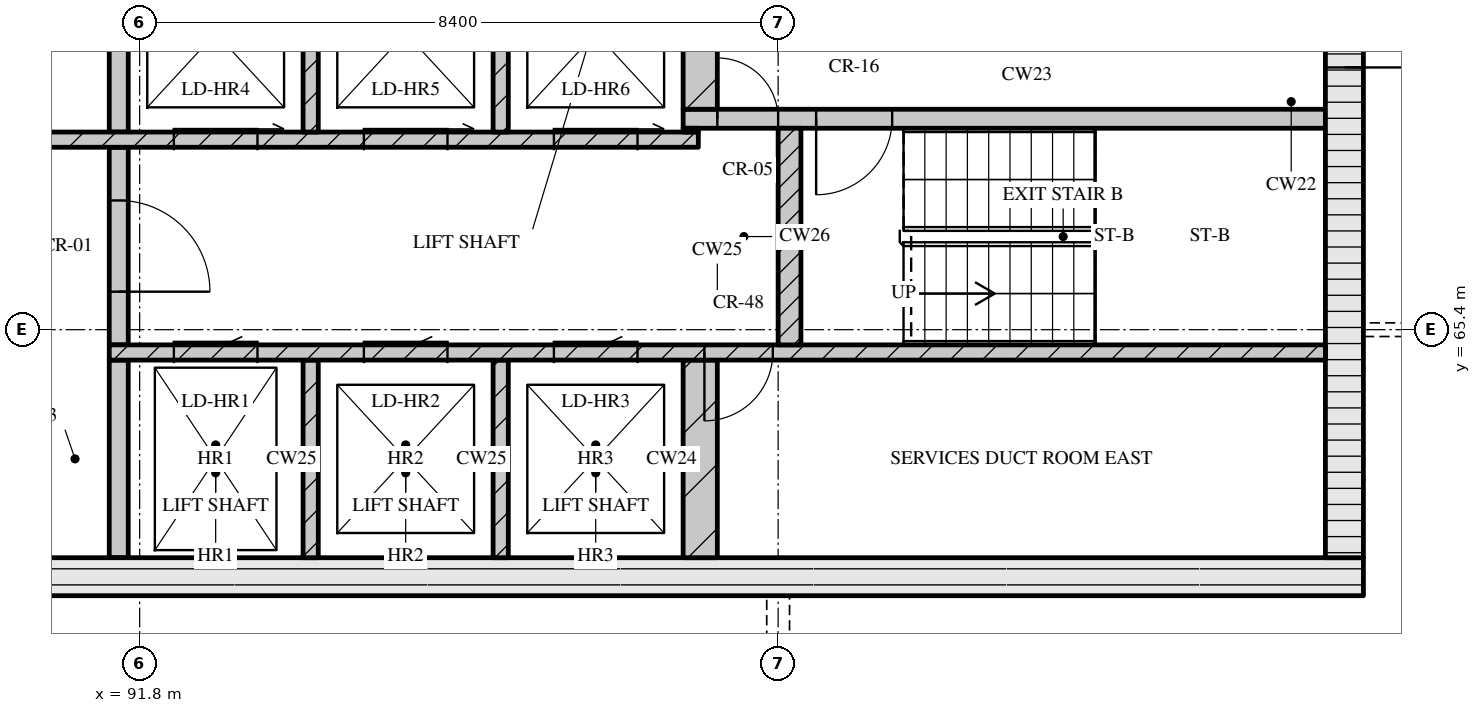
"""IFC4 building model, lengths in metres.
Left out: names, types, materials, properties, quantities, classifications, styles, units other than length and angle.
Written with IfcOpenShell. Run it as: python <this file> out.ifc"""

import sys

from ifc_helpers import new_model, si_unit, direction, frame, frame_2d, origin, place, context, subcontext, project, spatial, rectangle, extrude, element, fill, save


model = new_model("IFC4")
c1 = context("Model", 3, precision=1e-05, world=origin(), true_north=direction((0.0, 1.0)))
c2 = subcontext(c1, "Body", "Model", "MODEL_VIEW")
j1 = project(units=[si_unit("LENGTHUNIT", "METRE"), si_unit("PLANEANGLEUNIT", "RADIAN")], contexts=[c1])
p1 = place(None, origin())
s1 = spatial("IfcSite", under=j1, at=p1, CompositionType="ELEMENT")
p2 = place(p1, origin())
s2 = spatial("IfcBuilding", under=s1, at=p2, CompositionType="ELEMENT")
p3 = place(p2, frame((0.0, 0.0, 288.75)))
s3 = spatial("IfcBuildingStorey", under=s2, at=p3, CompositionType="ELEMENT", Elevation=288.75)
p4 = place(p3, frame((67.3, 62.15, 0.0), z_axis=(0.0, 0.0, 1.0), x_axis=(1.0, 0.0, 0.0)))
e1 = element("IfcWall", 1, at=p4, inside=s3, PredefinedType="SOLIDWALL", context=c2, shape_type="SweptSolid", body=[
    extrude(rectangle(XDim=40.6, YDim=0.5, at=frame_2d((20.3, 0.0))), origin(), (0.0, 0.0, 1.0), 3.32),
])
p5 = place(p4, frame((20.65, 0.0, 0.0)))
e2 = element("IfcOpeningElement", 2, at=p5, cuts=e1, PredefinedType="OPENING", context=c2, shape_type="SweptSolid", body=[
    extrude(rectangle(XDim=1.8, YDim=2.1, at=frame_2d((0.9, 1.05))), frame((0.0, 0.26, 0.0), z_axis=(0.0, -1.0, 0.0), x_axis=(1.0, 0.0, 0.0)), (0.0, 0.0, 1.0), 0.52),
])
p6 = place(p3, frame((107.65, 62.4, 0.0), z_axis=(0.0, 0.0, 1.0), x_axis=(0.0, 1.0, 0.0)))
e3 = element("IfcWall", 3, at=p6, inside=s3, PredefinedType="SOLIDWALL", context=c2, shape_type="SweptSolid", body=[
    extrude(rectangle(XDim=12.0, YDim=0.5, at=frame_2d((6.0, 0.0))), origin(), (0.0, 0.0, 1.0), 3.32),
])
p7 = place(p6, frame((6.45, 0.0, 0.0)))
e4 = element("IfcOpeningElement", 4, at=p7, cuts=e3, PredefinedType="OPENING", context=c2, shape_type="SweptSolid", body=[
    extrude(rectangle(XDim=1.2, YDim=2.1, at=frame_2d((0.6, 1.05))), frame((0.0, 0.26, 0.0), z_axis=(0.0, -1.0, 0.0), x_axis=(1.0, 0.0, 0.0)), (0.0, 0.0, 1.0), 0.52),
])
p8 = place(p3, frame((91.525, 62.4, 0.0), z_axis=(0.0, 0.0, 1.0), x_axis=(0.0, 1.0, 0.0)))
e5 = element("IfcWall", 5, at=p8, inside=s3, PredefinedType="SOLIDWALL", context=c2, shape_type="SweptSolid", body=[
    extrude(rectangle(XDim=2.6, YDim=0.25, at=frame_2d((1.3, 0.0))), origin(), (0.0, 0.0, 1.0), 3.32),
])
for number, where, z_axis, x_axis in (
    (6, (94.05, 62.4, 0.0), (0.0, 0.0, 1.0), (0.0, 1.0, 0.0)),
    (7, (96.55, 62.4, 0.0), (0.0, 0.0, 1.0), (0.0, 1.0, 0.0)),
):
    element("IfcWall", number, at=place(p3, frame(where, z_axis=z_axis, x_axis=x_axis)), inside=s3, PredefinedType="SOLIDWALL", context=c2, shape_type="SweptSolid", body=[
        extrude(rectangle(XDim=2.6, YDim=0.2, at=frame_2d((1.3, 0.0))), origin(), (0.0, 0.0, 1.0), 3.32),
    ])
p9 = place(p3, frame((99.175, 62.4, 0.0), z_axis=(0.0, 0.0, 1.0), x_axis=(0.0, 1.0, 0.0)))
e8 = element("IfcWall", 8, at=p9, inside=s3, PredefinedType="SOLIDWALL", context=c2, shape_type="SweptSolid", body=[
    extrude(rectangle(XDim=2.6, YDim=0.45, at=frame_2d((1.3, 0.0))), origin(), (0.0, 0.0, 1.0), 3.32),
])
p10 = place(p3, frame((91.4, 65.1, 0.0), z_axis=(0.0, 0.0, 1.0), x_axis=(1.0, 0.0, 0.0)))
e9 = element("IfcWall", 9, at=p10, inside=s3, PredefinedType="SOLIDWALL", context=c2, shape_type="SweptSolid", body=[
    extrude(rectangle(XDim=16.0, YDim=0.2, at=frame_2d((8.0, 0.0))), origin(), (0.0, 0.0, 1.0), 3.32),
])
p11 = place(p10, frame((0.85, 0.0, 0.0)))
e10 = element("IfcOpeningElement", 10, at=p11, cuts=e9, PredefinedType="OPENING", context=c2, shape_type="SweptSolid", body=[
    extrude(rectangle(XDim=1.1, YDim=2.1, at=frame_2d((0.55, 1.05))), frame((0.0, 0.11, 0.0), z_axis=(0.0, -1.0, 0.0), x_axis=(1.0, 0.0, 0.0)), (0.0, 0.0, 1.0), 0.22),
])
p12 = place(p10, frame((3.35, 0.0, 0.0)))
e11 = element("IfcOpeningElement", 11, at=p12, cuts=e9, PredefinedType="OPENING", context=c2, shape_type="SweptSolid", body=[
    extrude(rectangle(XDim=1.1, YDim=2.1, at=frame_2d((0.55, 1.05))), frame((0.0, 0.11, 0.0), z_axis=(0.0, -1.0, 0.0), x_axis=(1.0, 0.0, 0.0)), (0.0, 0.0, 1.0), 0.22),
])
p13 = place(p10, frame((5.85, 0.0, 0.0)))
e12 = element("IfcOpeningElement", 12, at=p13, cuts=e9, PredefinedType="OPENING", context=c2, shape_type="SweptSolid", body=[
    extrude(rectangle(XDim=1.1, YDim=2.1, at=frame_2d((0.55, 1.05))), frame((0.0, 0.11, 0.0), z_axis=(0.0, -1.0, 0.0), x_axis=(1.0, 0.0, 0.0)), (0.0, 0.0, 1.0), 0.22),
])
p14 = place(p10, frame((7.83, 0.0, 0.0)))
e13 = element("IfcOpeningElement", 13, at=p14, cuts=e9, PredefinedType="OPENING", context=c2, shape_type="SweptSolid", body=[
    extrude(rectangle(XDim=0.9, YDim=2.1, at=frame_2d((0.45, 1.05))), frame((0.0, 0.11, 0.0), z_axis=(0.0, -1.0, 0.0), x_axis=(1.0, 0.0, 0.0)), (0.0, 0.0, 1.0), 0.22),
])
p15 = place(p3, frame((91.525, 65.2, 0.0), z_axis=(0.0, 0.0, 1.0), x_axis=(0.0, 1.0, 0.0)))
e14 = element("IfcWall", 14, at=p15, inside=s3, PredefinedType="SOLIDWALL", context=c2, shape_type="SweptSolid", body=[
    extrude(rectangle(XDim=2.6, YDim=0.25, at=frame_2d((1.3, 0.0))), origin(), (0.0, 0.0, 1.0), 3.32),
])
p16 = place(p15, frame((0.7, 0.0, 0.0)))
e15 = element("IfcOpeningElement", 15, at=p16, cuts=e14, PredefinedType="OPENING", context=c2, shape_type="SweptSolid", body=[
    extrude(rectangle(XDim=1.2, YDim=2.1, at=frame_2d((0.6, 1.05))), frame((0.0, 0.135, 0.0), z_axis=(0.0, -1.0, 0.0), x_axis=(1.0, 0.0, 0.0)), (0.0, 0.0, 1.0), 0.27),
])
p17 = place(p3, frame((100.35, 65.2, 0.0), z_axis=(0.0, 0.0, 1.0), x_axis=(0.0, 1.0, 0.0)))
e16 = element("IfcWall", 16, at=p17, inside=s3, PredefinedType="SOLIDWALL", context=c2, shape_type="SweptSolid", body=[
    extrude(rectangle(XDim=2.85, YDim=0.3, at=frame_2d((1.425, 0.0))), origin(), (0.0, 0.0, 1.0), 3.32),
])
p18 = place(p3, frame((76.05, 67.9, 0.0), z_axis=(0.0, 0.0, 1.0), x_axis=(1.0, 0.0, 0.0)))
e17 = element("IfcWall", 17, at=p18, inside=s3, PredefinedType="SOLIDWALL", context=c2, shape_type="SweptSolid", body=[
    extrude(rectangle(XDim=23.1, YDim=0.2, at=frame_2d((11.55, 0.0))), origin(), (0.0, 0.0, 1.0), 3.32),
])
p19 = place(p18, frame((1.95, 0.0, 0.0)))
e18 = element("IfcOpeningElement", 18, at=p19, cuts=e17, PredefinedType="OPENING", context=c2, shape_type="SweptSolid", body=[
    extrude(rectangle(XDim=0.9, YDim=2.1, at=frame_2d((0.45, 1.05))), frame((0.0, 0.11, 0.0), z_axis=(0.0, -1.0, 0.0), x_axis=(1.0, 0.0, 0.0)), (0.0, 0.0, 1.0), 0.22),
])
p20 = place(p18, frame((5.66, 0.0, 0.0)))
e19 = element("IfcOpeningElement", 19, at=p20, cuts=e17, PredefinedType="OPENING", context=c2, shape_type="SweptSolid", body=[
    extrude(rectangle(XDim=0.9, YDim=2.1, at=frame_2d((0.45, 1.05))), frame((0.0, 0.11, 0.0), z_axis=(0.0, -1.0, 0.0), x_axis=(1.0, 0.0, 0.0)), (0.0, 0.0, 1.0), 0.22),
])
p21 = place(p18, frame((9.7, 0.0, 0.0)))
e20 = element("IfcOpeningElement", 20, at=p21, cuts=e17, PredefinedType="OPENING", context=c2, shape_type="SweptSolid", body=[
    extrude(rectangle(XDim=0.9, YDim=2.1, at=frame_2d((0.45, 1.05))), frame((0.0, 0.11, 0.0), z_axis=(0.0, -1.0, 0.0), x_axis=(1.0, 0.0, 0.0)), (0.0, 0.0, 1.0), 0.22),
])
p22 = place(p18, frame((13.55, 0.0, 0.0)))
e21 = element("IfcOpeningElement", 21, at=p22, cuts=e17, PredefinedType="OPENING", context=c2, shape_type="SweptSolid", body=[
    extrude(rectangle(XDim=1.0, YDim=2.1, at=frame_2d((0.5, 1.05))), frame((0.0, 0.11, 0.0), z_axis=(0.0, -1.0, 0.0), x_axis=(1.0, 0.0, 0.0)), (0.0, 0.0, 1.0), 0.22),
])
p23 = place(p18, frame((16.2, 0.0, 0.0)))
e22 = element("IfcOpeningElement", 22, at=p23, cuts=e17, PredefinedType="OPENING", context=c2, shape_type="SweptSolid", body=[
    extrude(rectangle(XDim=1.1, YDim=2.1, at=frame_2d((0.55, 1.05))), frame((0.0, 0.11, 0.0), z_axis=(0.0, -1.0, 0.0), x_axis=(1.0, 0.0, 0.0)), (0.0, 0.0, 1.0), 0.22),
])
p24 = place(p18, frame((18.7, 0.0, 0.0)))
e23 = element("IfcOpeningElement", 23, at=p24, cuts=e17, PredefinedType="OPENING", context=c2, shape_type="SweptSolid", body=[
    extrude(rectangle(XDim=1.1, YDim=2.1, at=frame_2d((0.55, 1.05))), frame((0.0, 0.11, 0.0), z_axis=(0.0, -1.0, 0.0), x_axis=(1.0, 0.0, 0.0)), (0.0, 0.0, 1.0), 0.22),
])
p25 = place(p18, frame((21.2, 0.0, 0.0)))
e24 = element("IfcOpeningElement", 24, at=p25, cuts=e17, PredefinedType="OPENING", context=c2, shape_type="SweptSolid", body=[
    extrude(rectangle(XDim=1.1, YDim=2.1, at=frame_2d((0.55, 1.05))), frame((0.0, 0.11, 0.0), z_axis=(0.0, -1.0, 0.0), x_axis=(1.0, 0.0, 0.0)), (0.0, 0.0, 1.0), 0.22),
])
p26 = place(p3, frame((91.525, 68.0, 0.0), z_axis=(0.0, 0.0, 1.0), x_axis=(0.0, 1.0, 0.0)))
e25 = element("IfcWall", 25, at=p26, inside=s3, PredefinedType="SOLIDWALL", context=c2, shape_type="SweptSolid", body=[
    extrude(rectangle(XDim=2.6, YDim=0.25, at=frame_2d((1.3, 0.0))), origin(), (0.0, 0.0, 1.0), 3.32),
])
for number, where, z_axis, x_axis in (
    (26, (94.05, 68.0, 0.0), (0.0, 0.0, 1.0), (0.0, 1.0, 0.0)),
    (27, (96.55, 68.0, 0.0), (0.0, 0.0, 1.0), (0.0, 1.0, 0.0)),
):
    element("IfcWall", number, at=place(p3, frame(where, z_axis=z_axis, x_axis=x_axis)), inside=s3, PredefinedType="SOLIDWALL", context=c2, shape_type="SweptSolid", body=[
        extrude(rectangle(XDim=2.6, YDim=0.2, at=frame_2d((1.3, 0.0))), origin(), (0.0, 0.0, 1.0), 3.32),
    ])
p27 = place(p3, frame((98.95, 68.025, 0.0), z_axis=(0.0, 0.0, 1.0), x_axis=(1.0, 0.0, 0.0)))
e28 = element("IfcWall", 28, at=p27, inside=s3, PredefinedType="SOLIDWALL", context=c2, shape_type="SweptSolid", body=[
    extrude(rectangle(XDim=0.2, YDim=0.05, at=frame_2d((0.1, 0.0))), origin(), (0.0, 0.0, 1.0), 3.32),
])
p28 = place(p3, frame((98.95, 68.175, 0.0), z_axis=(0.0, 0.0, 1.0), x_axis=(1.0, 0.0, 0.0)))
e29 = element("IfcWall", 29, at=p28, inside=s3, PredefinedType="SOLIDWALL", context=c2, shape_type="SweptSolid", body=[
    extrude(rectangle(XDim=8.45, YDim=0.25, at=frame_2d((4.225, 0.0))), origin(), (0.0, 0.0, 1.0), 3.32),
])
p29 = place(p28, frame((0.45, 0.0, 0.0)))
e30 = element("IfcOpeningElement", 30, at=p29, cuts=e29, PredefinedType="OPENING", context=c2, shape_type="SweptSolid", body=[
    extrude(rectangle(XDim=0.8, YDim=2.1, at=frame_2d((0.4, 1.05))), frame((0.0, 0.135, 0.0), z_axis=(0.0, -1.0, 0.0), x_axis=(1.0, 0.0, 0.0)), (0.0, 0.0, 1.0), 0.27),
])
p30 = place(p28, frame((1.75, 0.0, 0.0)))
e31 = element("IfcOpeningElement", 31, at=p30, cuts=e29, PredefinedType="OPENING", context=c2, shape_type="SweptSolid", body=[
    extrude(rectangle(XDim=1.0, YDim=2.1, at=frame_2d((0.5, 1.05))), frame((0.0, 0.135, 0.0), z_axis=(0.0, -1.0, 0.0), x_axis=(1.0, 0.0, 0.0)), (0.0, 0.0, 1.0), 0.27),
])
p31 = place(p3, frame((99.175, 68.3, 0.0), z_axis=(0.0, 0.0, 1.0), x_axis=(0.0, 1.0, 0.0)))
e32 = element("IfcWall", 32, at=p31, inside=s3, PredefinedType="SOLIDWALL", context=c2, shape_type="SweptSolid", body=[
    extrude(rectangle(XDim=2.3, YDim=0.45, at=frame_2d((1.15, 0.0))), origin(), (0.0, 0.0, 1.0), 3.32),
])
p32 = place(p11, origin())
e33 = element("IfcDoor", 33, at=p32, inside=s3, OperationType="SLIDING_TO_LEFT", PredefinedType="DOOR", context=c2, shape_type="SweptSolid", body=[
    extrude(rectangle(XDim=1.1, YDim=2.1, at=frame_2d((0.55, 1.05))), frame((0.0, 0.025, 0.0), z_axis=(0.0, -1.0, 0.0), x_axis=(1.0, 0.0, 0.0)), (0.0, 0.0, 1.0), 0.05),
])
fill(e10, e33)
p33 = place(p12, origin())
e34 = element("IfcDoor", 34, at=p33, inside=s3, OperationType="SLIDING_TO_LEFT", PredefinedType="DOOR", context=c2, shape_type="SweptSolid", body=[
    extrude(rectangle(XDim=1.1, YDim=2.1, at=frame_2d((0.55, 1.05))), frame((0.0, 0.025, 0.0), z_axis=(0.0, -1.0, 0.0), x_axis=(1.0, 0.0, 0.0)), (0.0, 0.0, 1.0), 0.05),
])
fill(e11, e34)
p34 = place(p13, origin())
e35 = element("IfcDoor", 35, at=p34, inside=s3, OperationType="SLIDING_TO_LEFT", PredefinedType="DOOR", context=c2, shape_type="SweptSolid", body=[
    extrude(rectangle(XDim=1.1, YDim=2.1, at=frame_2d((0.55, 1.05))), frame((0.0, 0.025, 0.0), z_axis=(0.0, -1.0, 0.0), x_axis=(1.0, 0.0, 0.0)), (0.0, 0.0, 1.0), 0.05),
])
fill(e12, e35)
p35 = place(p14, origin())
e36 = element("IfcDoor", 36, at=p35, inside=s3, OperationType="SINGLE_SWING_RIGHT", PredefinedType="DOOR", context=c2, shape_type="SweptSolid", body=[
    extrude(rectangle(XDim=0.9, YDim=2.1, at=frame_2d((0.45, 1.05))), frame((0.0, 0.025, 0.0), z_axis=(0.0, -1.0, 0.0), x_axis=(1.0, 0.0, 0.0)), (0.0, 0.0, 1.0), 0.05),
])
fill(e13, e36)
p36 = place(p16, origin())
e37 = element("IfcDoor", 37, at=p36, inside=s3, OperationType="SINGLE_SWING_RIGHT", PredefinedType="DOOR", context=c2, shape_type="SweptSolid", body=[
    extrude(rectangle(XDim=1.2, YDim=2.1, at=frame_2d((0.6, 1.05))), frame((0.0, 0.025, 0.0), z_axis=(0.0, -1.0, 0.0), x_axis=(1.0, 0.0, 0.0)), (0.0, 0.0, 1.0), 0.05),
])
fill(e15, e37)
p37 = place(p23, origin())
e38 = element("IfcDoor", 38, at=p37, inside=s3, OperationType="SLIDING_TO_RIGHT", PredefinedType="DOOR", context=c2, shape_type="SweptSolid", body=[
    extrude(rectangle(XDim=1.1, YDim=2.1, at=frame_2d((0.55, 1.05))), frame((0.0, 0.025, 0.0), z_axis=(0.0, -1.0, 0.0), x_axis=(1.0, 0.0, 0.0)), (0.0, 0.0, 1.0), 0.05),
])
fill(e22, e38)
p38 = place(p24, origin())
e39 = element("IfcDoor", 39, at=p38, inside=s3, OperationType="SLIDING_TO_RIGHT", PredefinedType="DOOR", context=c2, shape_type="SweptSolid", body=[
    extrude(rectangle(XDim=1.1, YDim=2.1, at=frame_2d((0.55, 1.05))), frame((0.0, 0.025, 0.0), z_axis=(0.0, -1.0, 0.0), x_axis=(1.0, 0.0, 0.0)), (0.0, 0.0, 1.0), 0.05),
])
fill(e23, e39)
p39 = place(p25, origin())
e40 = element("IfcDoor", 40, at=p39, inside=s3, OperationType="SLIDING_TO_RIGHT", PredefinedType="DOOR", context=c2, shape_type="SweptSolid", body=[
    extrude(rectangle(XDim=1.1, YDim=2.1, at=frame_2d((0.55, 1.05))), frame((0.0, 0.025, 0.0), z_axis=(0.0, -1.0, 0.0), x_axis=(1.0, 0.0, 0.0)), (0.0, 0.0, 1.0), 0.05),
])
fill(e24, e40)
p40 = place(p29, origin())
e41 = element("IfcDoor", 41, at=p40, inside=s3, OperationType="SINGLE_SWING_LEFT", PredefinedType="DOOR", context=c2, shape_type="SweptSolid", body=[
    extrude(rectangle(XDim=0.8, YDim=2.1, at=frame_2d((0.4, 1.05))), frame((0.0, 0.025, 0.0), z_axis=(0.0, -1.0, 0.0), x_axis=(1.0, 0.0, 0.0)), (0.0, 0.0, 1.0), 0.05),
])
fill(e30, e41)
p41 = place(p30, origin())
e42 = element("IfcDoor", 42, at=p41, inside=s3, OperationType="SINGLE_SWING_RIGHT", PredefinedType="DOOR", context=c2, shape_type="SweptSolid", body=[
    extrude(rectangle(XDim=1.0, YDim=2.1, at=frame_2d((0.5, 1.05))), frame((0.0, 0.025, 0.0), z_axis=(0.0, -1.0, 0.0), x_axis=(1.0, 0.0, 0.0)), (0.0, 0.0, 1.0), 0.05),
])
fill(e31, e42)
p42 = place(p7, origin())
e43 = element("IfcDoor", 43, at=p42, inside=s3, OperationType="SINGLE_SWING_RIGHT", PredefinedType="DOOR", context=c2, shape_type="SweptSolid", body=[
    extrude(rectangle(XDim=1.2, YDim=2.1, at=frame_2d((0.6, 1.05))), frame((0.0, 0.025, 0.0), z_axis=(0.0, -1.0, 0.0), x_axis=(1.0, 0.0, 0.0)), (0.0, 0.0, 1.0), 0.05),
])
fill(e4, e43)
save(model, sys.argv[1])
